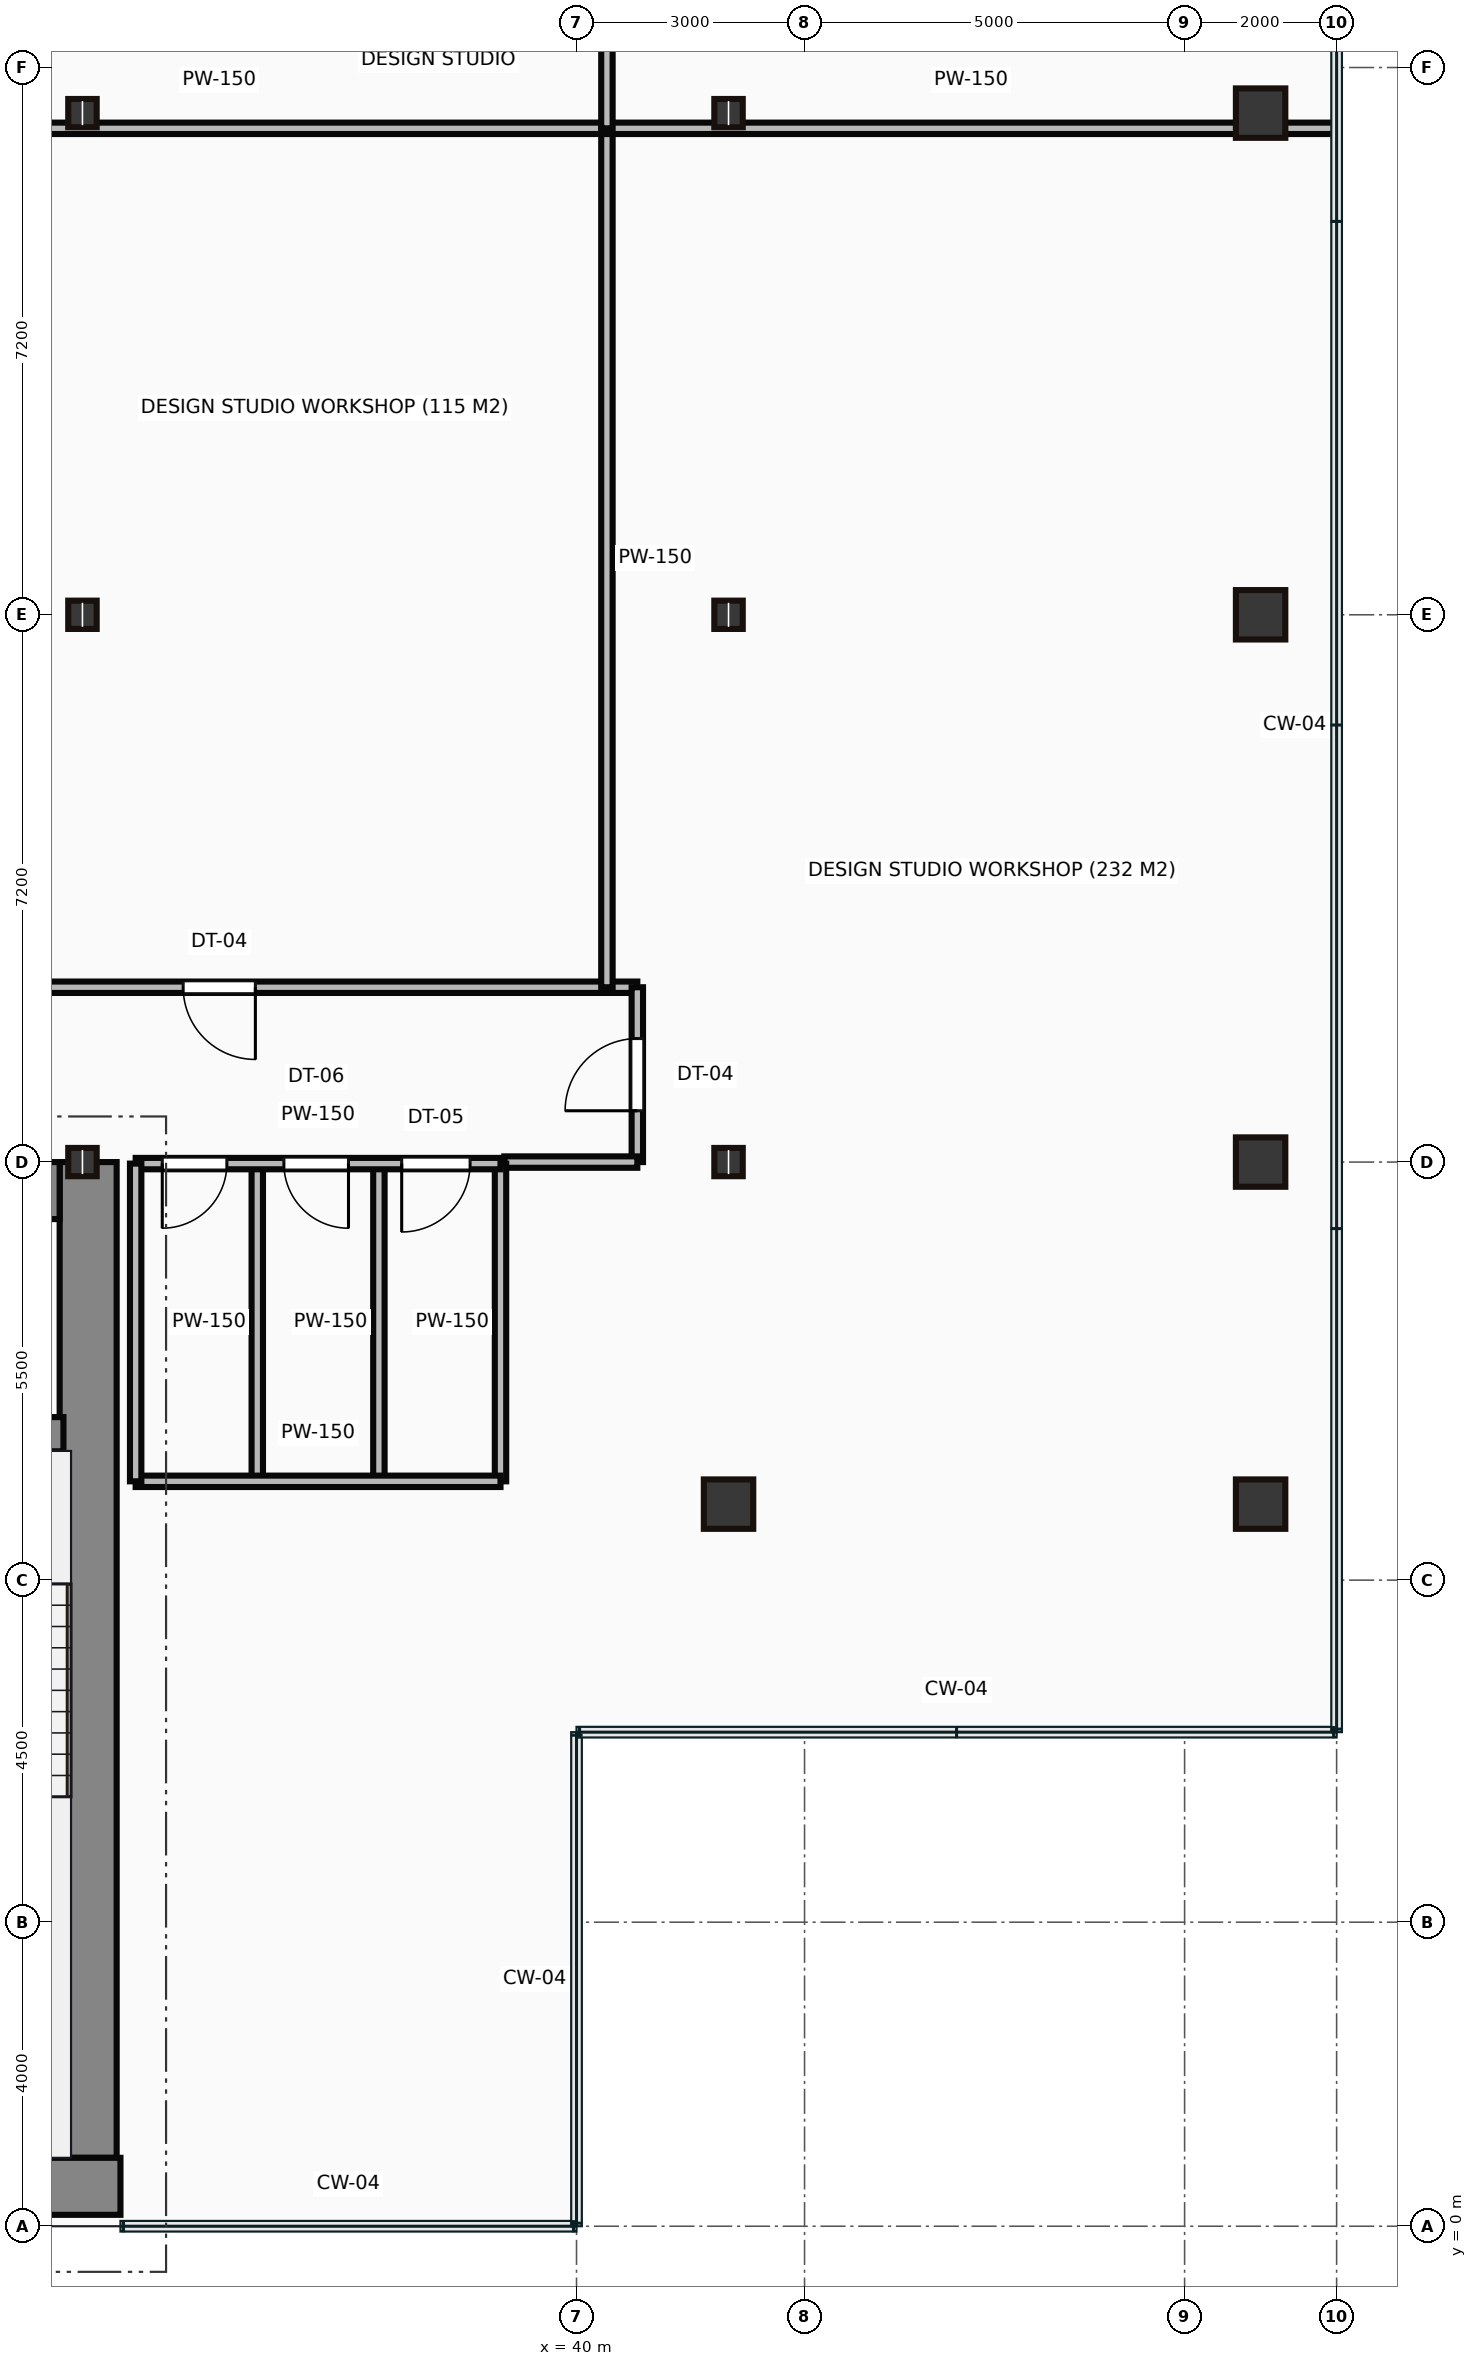
"""IFC4 building model, lengths in metres.
Left out: names, types, materials, properties, quantities, classifications, styles, units other than length and angle.
Written with IfcOpenShell. Run it as: python <this file> out.ifc"""

import sys

from ifc_helpers import new_model, si_unit, direction, frame, frame_2d, origin, origin_2d, place, context, subcontext, project, spatial, rectangle, hollow_rectangle, i_section, extrude, source, transform, mapped, element, fill, save


model = new_model("IFC4")
c1 = context("Model", 3, precision=1e-05, world=origin(), true_north=direction((0.0, 1.0)))
c2 = subcontext(c1, "Body", "Model", "MODEL_VIEW")
j1 = project(units=[si_unit("LENGTHUNIT", "METRE"), si_unit("PLANEANGLEUNIT", "RADIAN")], contexts=[c1])
p1 = place(None, origin())
s1 = spatial("IfcSite", under=j1, at=p1, CompositionType="ELEMENT")
p2 = place(p1, origin())
s2 = spatial("IfcBuilding", under=s1, at=p2, CompositionType="ELEMENT")
p3 = place(p2, frame((0.0, 0.0, 173.45)))
s3 = spatial("IfcBuildingStorey", under=s2, at=p3, CompositionType="ELEMENT", Elevation=173.45)
m1 = source(origin(), c2, "Body", "SweptSolid", [
    extrude(rectangle(XDim=29.5, YDim=0.75, at=frame_2d((14.75, 0.0))), origin(), (0.0, 0.0, 1.0), 3.65),
])
p4 = place(p3, frame((4.5, 0.525, 0.0), z_axis=(0.0, 0.0, 1.0), x_axis=(1.0, 0.0, 0.0)))
e1 = element("IfcWall", 1, at=p4, inside=s3, PredefinedType="SHEAR", context=c2, shape_type="MappedRepresentation", body=[
    mapped(m1, transform((0.0, 0.0, 0.0))),
])
m2 = source(origin(), c2, "Body", "SweptSolid", [
    extrude(rectangle(XDim=13.1, YDim=0.75, at=frame_2d((6.55, 0.0))), origin(), (0.0, 0.0, 1.0), 3.65),
])
p5 = place(p3, frame((33.575, 0.9, 0.0), z_axis=(0.0, 0.0, 1.0), x_axis=(0.0, 1.0, 0.0)))
e2 = element("IfcWall", 2, at=p5, inside=s3, PredefinedType="SHEAR", context=c2, shape_type="MappedRepresentation", body=[
    mapped(m2, transform((0.0, 0.0, 0.0))),
])
m3 = source(origin(), c2, "Body", "SweptSolid", [
    extrude(rectangle(XDim=12.6, YDim=0.75, at=frame_2d((6.3, 0.0))), origin(), (0.0, 0.0, 1.0), 3.65),
])
p6 = place(p3, frame((20.6, 13.625, 0.0), z_axis=(0.0, 0.0, 1.0), x_axis=(1.0, 0.0, 0.0)))
e3 = element("IfcWall", 3, at=p6, inside=s3, PredefinedType="SHEAR", context=c2, shape_type="MappedRepresentation", body=[
    mapped(m3, transform((0.0, 0.0, 0.0))),
])
p7 = place(p6, frame((9.25, 0.0, 0.0)))
e4 = element("IfcOpeningElement", 4, at=p7, cuts=e3, PredefinedType="OPENING", context=c2, shape_type="SweptSolid", body=[
    extrude(rectangle(XDim=1.1, YDim=2.15, at=frame_2d((0.55, 1.075))), frame((0.0, 0.385, 0.0), z_axis=(0.0, -1.0, 0.0), x_axis=(1.0, 0.0, 0.0)), (0.0, 0.0, 1.0), 0.77),
])
m4 = source(origin(), c2, "Body", "SweptSolid", [
    extrude(rectangle(XDim=3.39, YDim=0.45, at=frame_2d((1.695, 0.0))), origin(), (0.0, 0.0, 1.0), 3.65),
])
p8 = place(p3, frame((29.86, 10.42, 0.0), z_axis=(0.0, 0.0, 1.0), x_axis=(1.0, 0.0, 0.0)))
e5 = element("IfcWall", 5, at=p8, inside=s3, PredefinedType="SHEAR", context=c2, shape_type="MappedRepresentation", body=[
    mapped(m4, transform((0.0, 0.0, 0.0))),
])
p9 = place(p8, frame((1.1, 0.0, 0.0)))
e6 = element("IfcOpeningElement", 6, at=p9, cuts=e5, PredefinedType="OPENING", context=c2, shape_type="SweptSolid", body=[
    extrude(rectangle(XDim=1.1, YDim=2.15, at=frame_2d((0.55, 1.075))), frame((0.0, 0.235, 0.0), z_axis=(0.0, -1.0, 0.0), x_axis=(1.0, 0.0, 0.0)), (0.0, 0.0, 1.0), 0.47),
])
m5 = source(origin(), c2, "Body", "SweptSolid", [
    extrude(i_section(OverallWidth=0.374, OverallDepth=0.372, WebThickness=0.016, FlangeThickness=0.026, at=origin_2d()), origin(), (0.0, 0.0, 1.0), 3.65),
])
for number, where, z_axis, x_axis in (
    (7, (33.5, 14.0, 0.0), (0.0, 0.0, 1.0), (1.0, 0.0, 0.0)),
    (8, (33.5, 21.2, 0.0), (0.0, 0.0, 1.0), (1.0, 0.0, 0.0)),
    (9, (33.5, 27.8, 0.0), (0.0, 0.0, 1.0), (1.0, 0.0, 0.0)),
):
    element("IfcColumn", number, at=place(p3, frame(where, z_axis=z_axis, x_axis=x_axis)), inside=s3, PredefinedType="COLUMN", context=c2, shape_type="MappedRepresentation", body=[
        mapped(m5, transform((0.0, 0.0, 0.0))),
    ])
m6 = source(origin(), c2, "Body", "SweptSolid", [
    extrude(hollow_rectangle(XDim=0.65, YDim=0.65, WallThickness=0.032, at=origin_2d()), origin(), (0.0, 0.0, 1.0), 3.65),
])
p10 = place(p3, frame((42.0, 9.5, 0.0), z_axis=(0.0, 0.0, 1.0), x_axis=(1.0, 0.0, 0.0)))
e10 = element("IfcColumn", 10, at=p10, inside=s3, PredefinedType="COLUMN", context=c2, shape_type="MappedRepresentation", body=[
    mapped(m6, transform((0.0, 0.0, 0.0))),
])
for number, where, z_axis, x_axis in (
    (11, (42.0, 14.0, 0.0), (0.0, 0.0, 1.0), (1.0, 0.0, 0.0)),
    (12, (42.0, 21.2, 0.0), (0.0, 0.0, 1.0), (1.0, 0.0, 0.0)),
    (13, (42.0, 27.8, 0.0), (0.0, 0.0, 1.0), (1.0, 0.0, 0.0)),
):
    element("IfcColumn", number, at=place(p3, frame(where, z_axis=z_axis, x_axis=x_axis)), inside=s3, PredefinedType="COLUMN", context=c2, shape_type="MappedRepresentation", body=[
        mapped(m5, transform((0.0, 0.0, 0.0))),
    ])
for number, where, z_axis, x_axis in (
    (14, (49.0, 9.5, 0.0), (0.0, 0.0, 1.0), (1.0, 0.0, 0.0)),
    (15, (49.0, 14.0, 0.0), (0.0, 0.0, 1.0), (1.0, 0.0, 0.0)),
    (16, (49.0, 21.2, 0.0), (0.0, 0.0, 1.0), (1.0, 0.0, 0.0)),
    (17, (49.0, 27.8, 0.0), (0.0, 0.0, 1.0), (1.0, 0.0, 0.0)),
):
    element("IfcColumn", number, at=place(p3, frame(where, z_axis=z_axis, x_axis=x_axis)), inside=s3, PredefinedType="COLUMN", context=c2, shape_type="MappedRepresentation", body=[
        mapped(m6, transform((0.0, 0.0, 0.0))),
    ])
m7 = source(origin(), c2, "Body", "SweptSolid", [
    extrude(rectangle(XDim=4.8, YDim=0.15, at=frame_2d((2.4, 0.0))), origin(), (0.0, 0.0, 1.0), 2.76),
])
p11 = place(p3, frame((34.2, 13.98, 0.0), z_axis=(0.0, 0.0, 1.0), x_axis=(1.0, 0.0, 0.0)))
e18 = element("IfcWall", 18, at=p11, inside=s3, PredefinedType="PARTITIONING", context=c2, shape_type="MappedRepresentation", body=[
    mapped(m7, transform((0.0, 0.0, 0.0))),
])
p12 = place(p11, frame((0.35, 0.0, 0.0)))
e19 = element("IfcOpeningElement", 19, at=p12, cuts=e18, PredefinedType="OPENING", context=c2, shape_type="SweptSolid", body=[
    extrude(rectangle(XDim=0.85, YDim=2.1, at=frame_2d((0.425, 1.05))), frame((0.0, 0.085, 0.0), z_axis=(0.0, -1.0, 0.0), x_axis=(1.0, 0.0, 0.0)), (0.0, 0.0, 1.0), 0.17),
])
p13 = place(p11, frame((1.95, 0.0, 0.0)))
e20 = element("IfcOpeningElement", 20, at=p13, cuts=e18, PredefinedType="OPENING", context=c2, shape_type="SweptSolid", body=[
    extrude(rectangle(XDim=0.85, YDim=2.1, at=frame_2d((0.425, 1.05))), frame((0.0, 0.085, 0.0), z_axis=(0.0, -1.0, 0.0), x_axis=(1.0, 0.0, 0.0)), (0.0, 0.0, 1.0), 0.17),
])
p14 = place(p11, frame((3.5, 0.0, 0.0)))
e21 = element("IfcOpeningElement", 21, at=p14, cuts=e18, PredefinedType="OPENING", context=c2, shape_type="SweptSolid", body=[
    extrude(rectangle(XDim=0.9, YDim=2.1, at=frame_2d((0.45, 1.05))), frame((0.0, 0.085, 0.0), z_axis=(0.0, -1.0, 0.0), x_axis=(1.0, 0.0, 0.0)), (0.0, 0.0, 1.0), 0.17),
])
m8 = source(origin(), c2, "Body", "SweptSolid", [
    extrude(rectangle(XDim=4.8, YDim=0.15, at=frame_2d((2.4, 0.0))), origin(), (0.0, 0.0, 1.0), 3.4),
])
p15 = place(p3, frame((34.2, 9.8, 0.0), z_axis=(0.0, 0.0, 1.0), x_axis=(1.0, 0.0, 0.0)))
e22 = element("IfcWall", 22, at=p15, inside=s3, PredefinedType="PARTITIONING", context=c2, shape_type="MappedRepresentation", body=[
    mapped(m8, transform((0.0, 0.0, 0.0))),
])
m9 = source(origin(), c2, "Body", "SweptSolid", [
    extrude(rectangle(XDim=4.18, YDim=0.15, at=frame_2d((2.09, 0.0))), origin(), (0.0, 0.0, 1.0), 3.4),
])
for number, where, z_axis, x_axis in (
    (23, (39.0, 9.8, 0.0), (0.0, 0.0, 1.0), (0.0, 1.0, 0.0)),
    (24, (34.2, 9.8, 0.0), (0.0, 0.0, 1.0), (0.0, 1.0, 0.0)),
    (25, (35.8, 9.8, 0.0), (0.0, 0.0, 1.0), (0.0, 1.0, 0.0)),
    (26, (37.4, 9.8, 0.0), (0.0, 0.0, 1.0), (0.0, 1.0, 0.0)),
):
    element("IfcWall", number, at=place(p3, frame(where, z_axis=z_axis, x_axis=x_axis)), inside=s3, PredefinedType="PARTITIONING", context=c2, shape_type="MappedRepresentation", body=[
        mapped(m9, transform((0.0, 0.0, 0.0))),
    ])
m10 = source(origin(), c2, "Body", "SweptSolid", [
    extrude(rectangle(XDim=21.75, YDim=0.15, at=frame_2d((10.875, 0.0))), origin(), (0.0, 0.0, 1.0), 3.4),
])
p16 = place(p3, frame((19.05, 16.3, 0.0), z_axis=(0.0, 0.0, 1.0), x_axis=(1.0, 0.0, 0.0)))
e27 = element("IfcWall", 27, at=p16, inside=s3, PredefinedType="PARTITIONING", context=c2, shape_type="MappedRepresentation", body=[
    mapped(m10, transform((0.0, 0.0, 0.0))),
])
p17 = place(p16, frame((5.975, 0.0, 0.0)))
e28 = element("IfcOpeningElement", 28, at=p17, cuts=e27, PredefinedType="OPENING", context=c2, shape_type="SweptSolid", body=[
    extrude(rectangle(XDim=0.95, YDim=2.15, at=frame_2d((0.475, 1.075))), frame((0.0, 0.085, 0.0), z_axis=(0.0, -1.0, 0.0), x_axis=(1.0, 0.0, 0.0)), (0.0, 0.0, 1.0), 0.17),
])
p18 = place(p16, frame((15.775, 0.0, 0.0)))
e29 = element("IfcOpeningElement", 29, at=p18, cuts=e27, PredefinedType="OPENING", context=c2, shape_type="SweptSolid", body=[
    extrude(rectangle(XDim=0.95, YDim=2.15, at=frame_2d((0.475, 1.075))), frame((0.0, 0.085, 0.0), z_axis=(0.0, -1.0, 0.0), x_axis=(1.0, 0.0, 0.0)), (0.0, 0.0, 1.0), 0.17),
])
m11 = source(origin(), c2, "Body", "SweptSolid", [
    extrude(rectangle(XDim=2.3, YDim=0.15, at=frame_2d((1.15, 0.0))), origin(), (0.0, 0.0, 1.0), 3.4),
])
p19 = place(p3, frame((40.8, 16.3, 0.0), z_axis=(0.0, 0.0, 1.0), x_axis=(0.0, -1.0, 0.0)))
e30 = element("IfcWall", 30, at=p19, inside=s3, PredefinedType="PARTITIONING", context=c2, shape_type="MappedRepresentation", body=[
    mapped(m11, transform((0.0, 0.0, 0.0))),
])
p20 = place(p19, frame((0.675, 0.0, 0.0)))
e31 = element("IfcOpeningElement", 31, at=p20, cuts=e30, PredefinedType="OPENING", context=c2, shape_type="SweptSolid", body=[
    extrude(rectangle(XDim=0.95, YDim=2.15, at=frame_2d((0.475, 1.075))), frame((0.0, 0.085, 0.0), z_axis=(0.0, -1.0, 0.0), x_axis=(1.0, 0.0, 0.0)), (0.0, 0.0, 1.0), 0.17),
])
m12 = source(origin(), c2, "Body", "SweptSolid", [
    extrude(rectangle(XDim=1.75, YDim=0.15, at=frame_2d((0.875, 0.0))), origin(), (0.0, 0.0, 1.0), 2.76),
])
p21 = place(p3, frame((40.8, 14.0, 0.0), z_axis=(0.0, 0.0, 1.0), x_axis=(-1.0, 0.0, 0.0)))
e32 = element("IfcWall", 32, at=p21, inside=s3, PredefinedType="PARTITIONING", context=c2, shape_type="MappedRepresentation", body=[
    mapped(m12, transform((0.0, 0.0, 0.0))),
])
m13 = source(origin(), c2, "Body", "SweptSolid", [
    extrude(rectangle(XDim=10.2, YDim=0.15, at=frame_2d((5.1, 0.0))), origin(), (0.0, 0.0, 1.0), 3.4),
])
p22 = place(p3, frame((30.2, 27.6, 0.0), z_axis=(0.0, 0.0, 1.0), x_axis=(1.0, 0.0, 0.0)))
e33 = element("IfcWall", 33, at=p22, inside=s3, PredefinedType="PARTITIONING", context=c2, shape_type="MappedRepresentation", body=[
    mapped(m13, transform((0.0, 0.0, 0.0))),
])
m14 = source(origin(), c2, "Body", "SweptSolid", [
    extrude(rectangle(XDim=11.3, YDim=0.15, at=frame_2d((5.65, 0.0))), origin(), (0.0, 0.0, 1.0), 3.4),
])
p23 = place(p3, frame((40.4, 27.6, 0.0), z_axis=(0.0, 0.0, 1.0), x_axis=(0.0, -1.0, 0.0)))
e34 = element("IfcWall", 34, at=p23, inside=s3, PredefinedType="PARTITIONING", context=c2, shape_type="MappedRepresentation", body=[
    mapped(m14, transform((0.0, 0.0, 0.0))),
])
m15 = source(origin(), c2, "Body", "SweptSolid", [
    extrude(rectangle(XDim=9.58, YDim=0.15, at=frame_2d((4.79, 0.0))), origin(), (0.0, 0.0, 1.0), 3.4),
])
p24 = place(p3, frame((40.4, 27.6, 0.0), z_axis=(0.0, 0.0, 1.0), x_axis=(1.0, 0.0, 0.0)))
e35 = element("IfcWall", 35, at=p24, inside=s3, PredefinedType="PARTITIONING", context=c2, shape_type="MappedRepresentation", body=[
    mapped(m15, transform((0.0, 0.0, 0.0))),
])
m16 = source(origin(), c2, "Body", "SweptSolid", [
    extrude(rectangle(XDim=1.8, YDim=0.15, at=frame_2d((0.9, 0.0))), origin(), (0.0, 0.0, 1.0), 3.4),
])
p25 = place(p3, frame((40.4, 29.4, 0.0), z_axis=(0.0, 0.0, 1.0), x_axis=(0.0, -1.0, 0.0)))
e36 = element("IfcWall", 36, at=p25, inside=s3, PredefinedType="PARTITIONING", context=c2, shape_type="MappedRepresentation", body=[
    mapped(m16, transform((0.0, 0.0, 0.0))),
])
m17 = source(origin(), c2, "Body", "SweptSolid", [
    extrude(rectangle(XDim=0.85, YDim=2.1, at=frame_2d((0.425, 1.05))), frame((0.0, 0.025, 0.0), z_axis=(0.0, -1.0, 0.0), x_axis=(1.0, 0.0, 0.0)), (0.0, 0.0, 1.0), 0.05),
])
p26 = place(p12, frame((0.85, 0.0, 0.0), z_axis=(0.0, 0.0, 1.0), x_axis=(-1.0, 0.0, 0.0)))
e37 = element("IfcDoor", 37, at=p26, inside=s3, OperationType="SINGLE_SWING_LEFT", PredefinedType="DOOR", context=c2, shape_type="MappedRepresentation", body=[
    mapped(m17, transform((0.0, 0.0, 0.0))),
])
fill(e19, e37)
p27 = place(p13, frame((0.85, 0.0, 0.0), z_axis=(0.0, 0.0, 1.0), x_axis=(-1.0, 0.0, 0.0)))
e38 = element("IfcDoor", 38, at=p27, inside=s3, OperationType="SINGLE_SWING_RIGHT", PredefinedType="DOOR", context=c2, shape_type="MappedRepresentation", body=[
    mapped(m17, transform((0.0, 0.0, 0.0))),
])
fill(e20, e38)
m18 = source(origin(), c2, "Body", "SweptSolid", [
    extrude(rectangle(XDim=0.9, YDim=2.1, at=frame_2d((0.45, 1.05))), frame((0.0, 0.025, 0.0), z_axis=(0.0, -1.0, 0.0), x_axis=(1.0, 0.0, 0.0)), (0.0, 0.0, 1.0), 0.05),
])
p28 = place(p14, frame((0.9, 0.0, 0.0), z_axis=(0.0, 0.0, 1.0), x_axis=(-1.0, 0.0, 0.0)))
e39 = element("IfcDoor", 39, at=p28, inside=s3, OperationType="SINGLE_SWING_LEFT", PredefinedType="DOOR", context=c2, shape_type="MappedRepresentation", body=[
    mapped(m18, transform((0.0, 0.0, 0.0))),
])
fill(e21, e39)
m19 = source(origin(), c2, "Body", "SweptSolid", [
    extrude(rectangle(XDim=0.95, YDim=2.15, at=frame_2d((0.475, 1.075))), frame((0.0, 0.025, 0.0), z_axis=(0.0, -1.0, 0.0), x_axis=(1.0, 0.0, 0.0)), (0.0, 0.0, 1.0), 0.05),
])
p29 = place(p18, origin())
e40 = element("IfcDoor", 40, at=p29, inside=s3, OperationType="SINGLE_SWING_RIGHT", PredefinedType="DOOR", context=c2, shape_type="MappedRepresentation", body=[
    mapped(m19, transform((0.0, 0.0, 0.0))),
])
fill(e29, e40)
p30 = place(p20, origin())
e41 = element("IfcDoor", 41, at=p30, inside=s3, OperationType="SINGLE_SWING_RIGHT", PredefinedType="DOOR", context=c2, shape_type="MappedRepresentation", body=[
    mapped(m19, transform((0.0, 0.0, 0.0))),
])
fill(e31, e41)
save(model, sys.argv[1])
